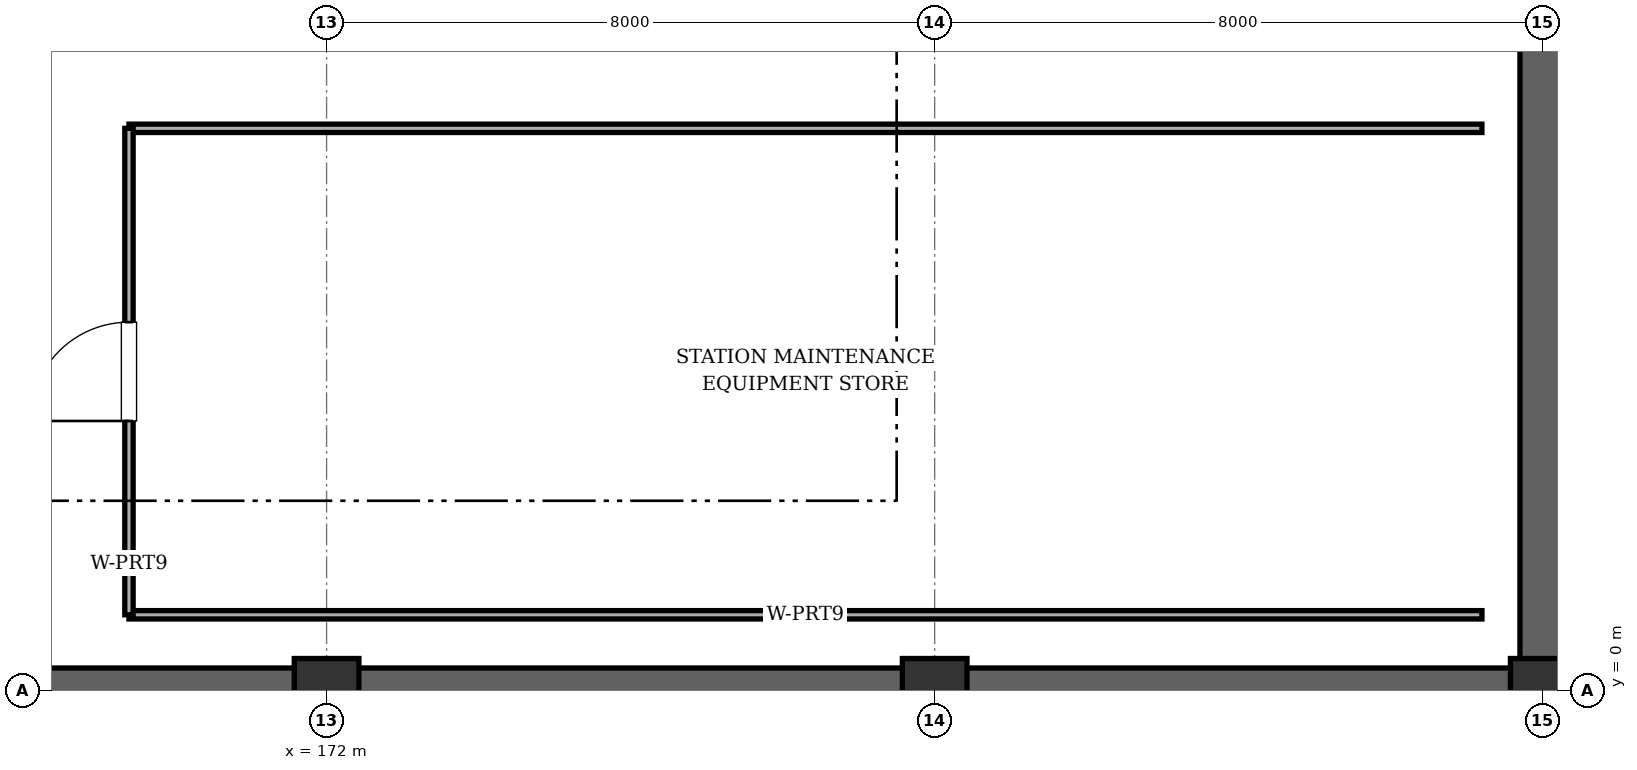
"""IFC4 building model, lengths in metres.
Left out: names, types, materials, properties, quantities, classifications, styles, units other than length and angle.
Written with IfcOpenShell. Run it as: python <this file> out.ifc"""

import sys

from ifc_helpers import new_model, si_unit, direction, frame, frame_2d, origin, origin_2d, place, context, subcontext, project, spatial, rectangle, extrude, element, fill, save


model = new_model("IFC4")
c1 = context("Model", 3, precision=1e-05, world=origin(), true_north=direction((0.0, 1.0)))
c2 = subcontext(c1, "Body", "Model", "MODEL_VIEW")
j1 = project(units=[si_unit("LENGTHUNIT", "METRE"), si_unit("PLANEANGLEUNIT", "RADIAN")], contexts=[c1])
p1 = place(None, origin())
s1 = spatial("IfcSite", under=j1, at=p1, CompositionType="ELEMENT")
p2 = place(p1, origin())
s2 = spatial("IfcBuilding", under=s1, at=p2, CompositionType="ELEMENT")
p3 = place(p2, frame((0.0, 0.0, -5.4)))
s3 = spatial("IfcBuildingStorey", under=s2, at=p3, CompositionType="ELEMENT", Elevation=-5.4)
for number, where, z_axis, x_axis in (
    (1, (172.0, 0.0, 0.0), (0.0, 0.0, 1.0), (1.0, 0.0, 0.0)),
    (2, (180.0, 0.0, 0.0), (0.0, 0.0, 1.0), (1.0, 0.0, 0.0)),
    (3, (188.0, 0.0, 0.0), (0.0, 0.0, 1.0), (1.0, 0.0, 0.0)),
):
    element("IfcColumn", number, at=place(p3, frame(where, z_axis=z_axis, x_axis=x_axis)), inside=s3, PredefinedType="COLUMN", context=c2, shape_type="SweptSolid", body=[
        extrude(rectangle(XDim=0.85, YDim=0.85, at=origin_2d()), origin(), (0.0, 0.0, 1.0), 5.4),
    ])
p4 = place(p3, frame((136.0, 0.0, 0.0), z_axis=(0.0, 0.0, 1.0), x_axis=(1.0, 0.0, 0.0)))
e4 = element("IfcWall", 4, at=p4, inside=s3, PredefinedType="USERDEFINED", context=c2, shape_type="SweptSolid", body=[
    extrude(rectangle(XDim=52.0, YDim=0.6, at=frame_2d((26.0, 0.0))), origin(), (0.0, 0.0, 1.0), 5.1),
])
p5 = place(p3, frame((188.0, 0.0, 0.0), z_axis=(0.0, 0.0, 1.0), x_axis=(0.0, 1.0, 0.0)))
e5 = element("IfcWall", 5, at=p5, inside=s3, PredefinedType="USERDEFINED", context=c2, shape_type="SweptSolid", body=[
    extrude(rectangle(XDim=56.2, YDim=0.6, at=frame_2d((28.1, 0.0))), origin(), (0.0, 0.0, 1.0), 5.1),
])
for number, where, z_axis, x_axis in (
    (6, (187.2, 1.0, 0.0), (0.0, 0.0, 1.0), (-1.0, 0.0, 0.0)),
    (7, (169.4, 7.4, 0.0), (0.0, 0.0, 1.0), (1.0, 0.0, 0.0)),
):
    element("IfcWall", number, at=place(p3, frame(where, z_axis=z_axis, x_axis=x_axis)), inside=s3, PredefinedType="PARTITIONING", context=c2, shape_type="SweptSolid", body=[
        extrude(rectangle(XDim=17.8, YDim=0.11, at=frame_2d((8.9, 0.0))), origin(), (0.0, 0.0, 1.0), 4.4),
    ])
p6 = place(p3, frame((169.4, 1.0, 0.0), z_axis=(0.0, 0.0, 1.0), x_axis=(0.0, 1.0, 0.0)))
e8 = element("IfcWall", 8, at=p6, inside=s3, PredefinedType="PARTITIONING", context=c2, shape_type="SweptSolid", body=[
    extrude(rectangle(XDim=6.4, YDim=0.11, at=frame_2d((3.2, 0.0))), origin(), (0.0, 0.0, 1.0), 4.4),
])
p7 = place(p6, frame((2.55, 0.0, 0.0)))
e9 = element("IfcOpeningElement", 9, at=p7, cuts=e8, PredefinedType="OPENING", context=c2, shape_type="SweptSolid", body=[
    extrude(rectangle(XDim=1.3, YDim=2.1, at=frame_2d((0.65, 1.05))), frame((0.0, 0.065, 0.0), z_axis=(0.0, -1.0, 0.0), x_axis=(1.0, 0.0, 0.0)), (0.0, 0.0, 1.0), 0.13),
])
p8 = place(p7, origin())
e10 = element("IfcDoor", 10, at=p8, inside=s3, OperationType="SINGLE_SWING_LEFT", PredefinedType="DOOR", context=c2, shape_type="SweptSolid", body=[
    extrude(rectangle(XDim=1.3, YDim=2.1, at=frame_2d((0.65, 1.05))), frame((0.0, 0.025, 0.0), z_axis=(0.0, -1.0, 0.0), x_axis=(1.0, 0.0, 0.0)), (0.0, 0.0, 1.0), 0.05),
])
fill(e9, e10)
save(model, sys.argv[1])
